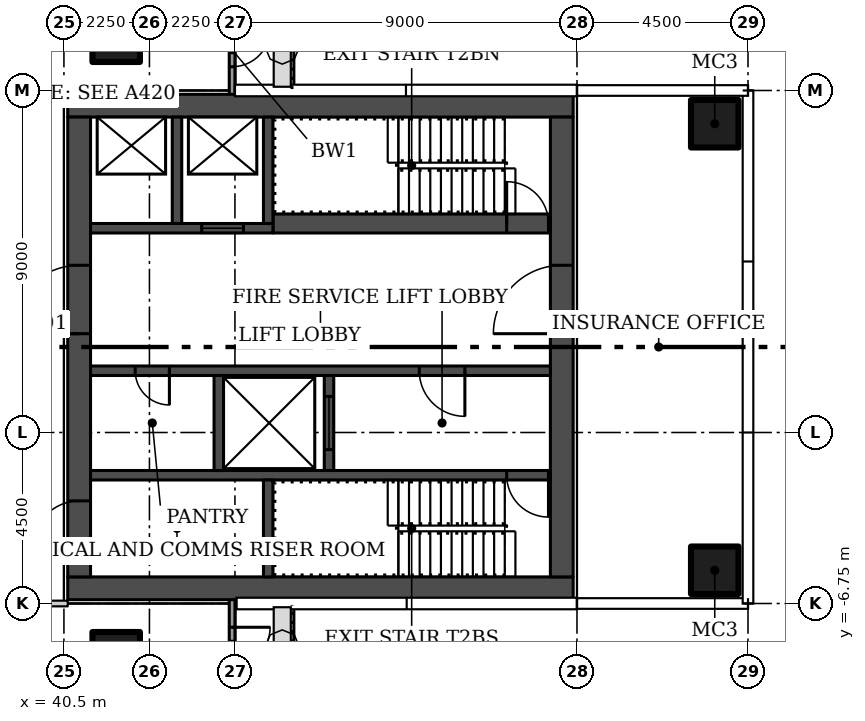
"""IFC4 building model, lengths in metres.
Left out: names, types, materials, properties, quantities, classifications, styles, units other than length and angle.
Written with IfcOpenShell. Run it as: python <this file> out.ifc"""

import sys

from ifc_helpers import new_model, si_unit, direction, frame, frame_2d, origin, origin_2d, place, context, subcontext, project, spatial, rectangle, hollow_rectangle, extrude, element, fill, save


model = new_model("IFC4")
c1 = context("Model", 3, precision=1e-05, world=origin(), true_north=direction((0.0, 1.0)))
c2 = subcontext(c1, "Body", "Model", "MODEL_VIEW")
j1 = project(units=[si_unit("LENGTHUNIT", "METRE"), si_unit("PLANEANGLEUNIT", "RADIAN")], contexts=[c1])
p1 = place(None, origin())
s1 = spatial("IfcSite", under=j1, at=p1, CompositionType="ELEMENT")
p2 = place(p1, origin())
s2 = spatial("IfcBuilding", under=s1, at=p2, CompositionType="ELEMENT")
p3 = place(p2, frame((0.0, 0.0, 120.9)))
s3 = spatial("IfcBuildingStorey", under=s2, at=p3, CompositionType="ELEMENT", Elevation=120.9)
for number, where in (
    (1, (41.875, 8.125, 0.0)),
    (2, (41.875, -8.125, 0.0)),
    (3, (57.625, -5.875, 0.0)),
    (4, (57.625, 5.875, 0.0)),
):
    element("IfcColumn", number, at=place(p3, frame(where)), inside=s3, PredefinedType="COLUMN", context=c2, shape_type="SweptSolid", body=[
        extrude(hollow_rectangle(XDim=1.25, YDim=1.25, WallThickness=0.05, at=origin_2d()), origin(), (0.0, 0.0, 1.0), 3.55),
    ])
p4 = place(p3, frame((26.9, 6.75, 0.0)))
e5 = element("IfcWall", 5, at=p4, inside=s3, PredefinedType="PARTITIONING", context=c2, shape_type="SweptSolid", body=[
    extrude(rectangle(XDim=13.7, YDim=0.15, at=frame_2d((6.85, 0.0))), origin(), (0.0, 0.0, 1.0), 3.55),
])
p5 = place(p4, frame((10.6, 0.0, 0.0)))
e6 = element("IfcOpeningElement", 6, at=p5, cuts=e5, PredefinedType="OPENING", context=c2, shape_type="SweptSolid", body=[
    extrude(rectangle(XDim=1.5, YDim=2.1, at=frame_2d((0.75, 1.05))), frame((0.0, 0.085, 0.0), z_axis=(0.0, -1.0, 0.0), x_axis=(1.0, 0.0, 0.0)), (0.0, 0.0, 1.0), 0.17),
])
p6 = place(p4, frame((6.1, 0.0, 0.0)))
e7 = element("IfcOpeningElement", 7, at=p6, cuts=e5, PredefinedType="OPENING", context=c2, shape_type="SweptSolid", body=[
    extrude(rectangle(XDim=1.5, YDim=2.1, at=frame_2d((0.75, 1.05))), frame((0.0, 0.085, 0.0), z_axis=(0.0, -1.0, 0.0), x_axis=(1.0, 0.0, 0.0)), (0.0, 0.0, 1.0), 0.17),
])
p7 = place(p4, frame((1.6, 0.0, 0.0)))
e8 = element("IfcOpeningElement", 8, at=p7, cuts=e5, PredefinedType="OPENING", context=c2, shape_type="SweptSolid", body=[
    extrude(rectangle(XDim=1.5, YDim=2.1, at=frame_2d((0.75, 1.05))), frame((0.0, 0.085, 0.0), z_axis=(0.0, -1.0, 0.0), x_axis=(1.0, 0.0, 0.0)), (0.0, 0.0, 1.0), 0.17),
])
p8 = place(p3, frame((40.6, -6.75, 0.0), z_axis=(0.0, 0.0, 1.0), x_axis=(-1.0, 0.0, 0.0)))
e9 = element("IfcWall", 9, at=p8, inside=s3, PredefinedType="PARTITIONING", context=c2, shape_type="SweptSolid", body=[
    extrude(rectangle(XDim=13.7, YDim=0.15, at=frame_2d((6.85, 0.0))), origin(), (0.0, 0.0, 1.0), 3.55),
])
p9 = place(p8, frame((10.6, 0.0, 0.0)))
e10 = element("IfcOpeningElement", 10, at=p9, cuts=e9, PredefinedType="OPENING", context=c2, shape_type="SweptSolid", body=[
    extrude(rectangle(XDim=1.5, YDim=2.1, at=frame_2d((0.75, 1.05))), frame((0.0, 0.085, 0.0), z_axis=(0.0, -1.0, 0.0), x_axis=(1.0, 0.0, 0.0)), (0.0, 0.0, 1.0), 0.17),
])
p10 = place(p8, frame((4.1, 0.0, 0.0)))
e11 = element("IfcOpeningElement", 11, at=p10, cuts=e9, PredefinedType="OPENING", context=c2, shape_type="SweptSolid", body=[
    extrude(rectangle(XDim=1.0, YDim=2.4, at=frame_2d((0.5, 1.2))), frame((0.0, 0.085, 0.0), z_axis=(0.0, -1.0, 0.0), x_axis=(1.0, 0.0, 0.0)), (0.0, 0.0, 1.0), 0.17),
])
p11 = place(p3, frame((44.925, 9.0, 0.0), z_axis=(0.0, 0.0, 1.0), x_axis=(0.0, -1.0, 0.0)))
e12 = element("IfcWall", 12, at=p11, inside=s3, PredefinedType="SOLIDWALL", context=c2, shape_type="SweptSolid", body=[
    extrude(rectangle(XDim=2.357, YDim=0.15, at=frame_2d((1.178, 0.0))), origin(), (0.0, 0.0, 1.0), 3.45),
])
p12 = place(p11, frame((0.625, 0.0, 0.0)))
e13 = element("IfcOpeningElement", 13, at=p12, cuts=e12, PredefinedType="OPENING", context=c2, shape_type="SweptSolid", body=[
    extrude(rectangle(XDim=1.0, YDim=2.4, at=frame_2d((0.5, 1.2))), frame((0.0, 0.085, 0.0), z_axis=(0.0, -1.0, 0.0), x_axis=(1.0, 0.0, 0.0)), (0.0, 0.0, 1.0), 0.17),
])
p13 = place(p3, frame((44.925, -6.643, 0.0), z_axis=(0.0, 0.0, 1.0), x_axis=(0.0, -1.0, 0.0)))
e14 = element("IfcWall", 14, at=p13, inside=s3, PredefinedType="SOLIDWALL", context=c2, shape_type="SweptSolid", body=[
    extrude(rectangle(XDim=2.357, YDim=0.15, at=frame_2d((1.178, 0.0))), origin(), (0.0, 0.0, 1.0), 3.45),
])
p14 = place(p13, frame((0.732, 0.0, 0.0)))
e15 = element("IfcOpeningElement", 15, at=p14, cuts=e14, PredefinedType="OPENING", context=c2, shape_type="SweptSolid", body=[
    extrude(rectangle(XDim=1.0, YDim=2.4, at=frame_2d((0.5, 1.2))), frame((0.0, 0.085, 0.0), z_axis=(0.0, -1.0, 0.0), x_axis=(1.0, 0.0, 0.0)), (0.0, 0.0, 1.0), 0.17),
])
for number, where, z_axis, x_axis in (
    (16, (53.9, -6.35, 0.0), (0.0, 0.0, 1.0), (-1.0, 0.0, 0.0)),
    (17, (53.9, 6.35, 0.0), (0.0, 0.0, 1.0), (-1.0, 0.0, 0.0)),
):
    element("IfcWall", number, at=place(p3, frame(where, z_axis=z_axis, x_axis=x_axis)), inside=s3, PredefinedType="SHEAR", context=c2, shape_type="SweptSolid", body=[
        extrude(rectangle(XDim=13.3, YDim=0.6, at=frame_2d((6.65, 0.0))), origin(), (0.0, 0.0, 1.0), 3.55),
    ])
p15 = place(p3, frame((53.6, -6.05, 0.0), z_axis=(0.0, 0.0, 1.0), x_axis=(0.0, 1.0, 0.0)))
e18 = element("IfcWall", 18, at=p15, inside=s3, PredefinedType="SHEAR", context=c2, shape_type="SweptSolid", body=[
    extrude(rectangle(XDim=12.1, YDim=0.6, at=frame_2d((6.05, 0.0))), origin(), (0.0, 0.0, 1.0), 3.55),
])
p16 = place(p15, frame((6.4, 0.0, 0.0)))
e19 = element("IfcOpeningElement", 19, at=p16, cuts=e18, PredefinedType="OPENING", context=c2, shape_type="SweptSolid", body=[
    extrude(rectangle(XDim=1.8, YDim=2.4, at=frame_2d((0.9, 1.2))), frame((0.0, 0.31, 0.0), z_axis=(0.0, -1.0, 0.0), x_axis=(1.0, 0.0, 0.0)), (0.0, 0.0, 1.0), 0.62),
])
p17 = place(p3, frame((40.9, -6.05, 0.0), z_axis=(0.0, 0.0, 1.0), x_axis=(0.0, 1.0, 0.0)))
e20 = element("IfcWall", 20, at=p17, inside=s3, PredefinedType="SHEAR", context=c2, shape_type="SweptSolid", body=[
    extrude(rectangle(XDim=12.1, YDim=0.6, at=frame_2d((6.05, 0.0))), origin(), (0.0, 0.0, 1.0), 3.55),
])
p18 = place(p17, frame((0.8, 0.0, 0.0)))
e21 = element("IfcOpeningElement", 21, at=p18, cuts=e20, PredefinedType="OPENING", context=c2, shape_type="SweptSolid", body=[
    extrude(rectangle(XDim=1.2, YDim=2.1, at=frame_2d((0.6, 1.05))), frame((0.0, 0.31, 0.0), z_axis=(0.0, -1.0, 0.0), x_axis=(1.0, 0.0, 0.0)), (0.0, 0.0, 1.0), 0.62),
])
p19 = place(p17, frame((6.4, 0.0, 0.0)))
e22 = element("IfcOpeningElement", 22, at=p19, cuts=e20, PredefinedType="OPENING", context=c2, shape_type="SweptSolid", body=[
    extrude(rectangle(XDim=1.8, YDim=2.4, at=frame_2d((0.9, 1.2))), frame((0.0, 0.31, 0.0), z_axis=(0.0, -1.0, 0.0), x_axis=(1.0, 0.0, 0.0)), (0.0, 0.0, 1.0), 0.62),
])
p20 = place(p3, frame((53.3, -3.375, 0.0), z_axis=(0.0, 0.0, 1.0), x_axis=(-1.0, 0.0, 0.0)))
e23 = element("IfcWall", 23, at=p20, inside=s3, PredefinedType="SHEAR", context=c2, shape_type="SweptSolid", body=[
    extrude(rectangle(XDim=12.1, YDim=0.25, at=frame_2d((6.05, 0.0))), origin(), (0.0, 0.0, 1.0), 3.55),
])
p21 = place(p20, frame((0.05, 0.0, 0.0)))
e24 = element("IfcOpeningElement", 24, at=p21, cuts=e23, PredefinedType="OPENING", context=c2, shape_type="SweptSolid", body=[
    extrude(rectangle(XDim=1.1, YDim=2.1, at=frame_2d((0.55, 1.05))), frame((0.0, 0.135, 0.0), z_axis=(0.0, -1.0, 0.0), x_axis=(1.0, 0.0, 0.0)), (0.0, 0.0, 1.0), 0.27),
])
p22 = place(p3, frame((45.875, -6.05, 0.0), z_axis=(0.0, 0.0, 1.0), x_axis=(0.0, 1.0, 0.0)))
e25 = element("IfcWall", 25, at=p22, inside=s3, PredefinedType="SHEAR", context=c2, shape_type="SweptSolid", body=[
    extrude(rectangle(XDim=2.55, YDim=0.25, at=frame_2d((1.275, 0.0))), origin(), (0.0, 0.0, 1.0), 3.55),
])
p23 = place(p3, frame((53.3, -0.625, 0.0), z_axis=(0.0, 0.0, 1.0), x_axis=(-1.0, 0.0, 0.0)))
e26 = element("IfcWall", 26, at=p23, inside=s3, PredefinedType="SHEAR", context=c2, shape_type="SweptSolid", body=[
    extrude(rectangle(XDim=12.1, YDim=0.25, at=frame_2d((6.05, 0.0))), origin(), (0.0, 0.0, 1.0), 3.55),
])
p24 = place(p23, frame((2.25, 0.0, 0.0)))
e27 = element("IfcOpeningElement", 27, at=p24, cuts=e26, PredefinedType="OPENING", context=c2, shape_type="SweptSolid", body=[
    extrude(rectangle(XDim=1.2, YDim=2.1, at=frame_2d((0.6, 1.05))), frame((0.0, 0.135, 0.0), z_axis=(0.0, -1.0, 0.0), x_axis=(1.0, 0.0, 0.0)), (0.0, 0.0, 1.0), 0.27),
])
p25 = place(p23, frame((10.025, 0.0, 0.0)))
e28 = element("IfcOpeningElement", 28, at=p25, cuts=e26, PredefinedType="OPENING", context=c2, shape_type="SweptSolid", body=[
    extrude(rectangle(XDim=0.9, YDim=2.1, at=frame_2d((0.45, 1.05))), frame((0.0, 0.135, 0.0), z_axis=(0.0, -1.0, 0.0), x_axis=(1.0, 0.0, 0.0)), (0.0, 0.0, 1.0), 0.27),
])
p26 = place(p3, frame((47.475, -3.25, 0.0), z_axis=(0.0, 0.0, 1.0), x_axis=(0.0, 1.0, 0.0)))
e29 = element("IfcWall", 29, at=p26, inside=s3, PredefinedType="SHEAR", context=c2, shape_type="SweptSolid", body=[
    extrude(rectangle(XDim=2.5, YDim=0.25, at=frame_2d((1.25, 0.0))), origin(), (0.0, 0.0, 1.0), 3.55),
])
p27 = place(p26, frame((0.55, 0.0, 0.0)))
e30 = element("IfcOpeningElement", 30, at=p27, cuts=e29, PredefinedType="OPENING", context=c2, shape_type="SweptSolid", body=[
    extrude(rectangle(XDim=1.4, YDim=2.4, at=frame_2d((0.7, 1.2))), frame((0.0, 0.135, 0.0), z_axis=(0.0, -1.0, 0.0), x_axis=(1.0, 0.0, 0.0)), (0.0, 0.0, 1.0), 0.27),
])
p28 = place(p3, frame((44.575, -3.25, 0.0), z_axis=(0.0, 0.0, 1.0), x_axis=(0.0, 1.0, 0.0)))
e31 = element("IfcWall", 31, at=p28, inside=s3, PredefinedType="SHEAR", context=c2, shape_type="SweptSolid", body=[
    extrude(rectangle(XDim=2.5, YDim=0.25, at=frame_2d((1.25, 0.0))), origin(), (0.0, 0.0, 1.0), 3.55),
])
p29 = place(p3, frame((46.0, 3.25, 0.0)))
e32 = element("IfcWall", 32, at=p29, inside=s3, PredefinedType="SHEAR", context=c2, shape_type="SweptSolid", body=[
    extrude(rectangle(XDim=7.3, YDim=0.5, at=frame_2d((3.65, 0.0))), origin(), (0.0, 0.0, 1.0), 3.55),
])
p30 = place(p29, frame((6.15, 0.0, 0.0)))
e33 = element("IfcOpeningElement", 33, at=p30, cuts=e32, PredefinedType="OPENING", context=c2, shape_type="SweptSolid", body=[
    extrude(rectangle(XDim=1.1, YDim=2.1, at=frame_2d((0.55, 1.05))), frame((0.0, 0.26, 0.0), z_axis=(0.0, -1.0, 0.0), x_axis=(1.0, 0.0, 0.0)), (0.0, 0.0, 1.0), 0.52),
])
p31 = place(p3, frame((46.0, 3.125, 0.0), z_axis=(0.0, 0.0, 1.0), x_axis=(-1.0, 0.0, 0.0)))
e34 = element("IfcWall", 34, at=p31, inside=s3, PredefinedType="SHEAR", context=c2, shape_type="SweptSolid", body=[
    extrude(rectangle(XDim=4.8, YDim=0.25, at=frame_2d((2.4, 0.0))), origin(), (0.0, 0.0, 1.0), 3.55),
])
p32 = place(p31, frame((0.775, 0.0, 0.0)))
e35 = element("IfcOpeningElement", 35, at=p32, cuts=e34, PredefinedType="OPENING", context=c2, shape_type="SweptSolid", body=[
    extrude(rectangle(XDim=1.1, YDim=2.1, at=frame_2d((0.55, 1.05))), frame((0.0, 0.135, 0.0), z_axis=(0.0, -1.0, 0.0), x_axis=(1.0, 0.0, 0.0)), (0.0, 0.0, 1.0), 0.27),
])
for number, where, z_axis, x_axis in (
    (36, (45.875, 3.25, 0.0), (0.0, 0.0, 1.0), (0.0, 1.0, 0.0)),
    (37, (43.475, 3.25, 0.0), (0.0, 0.0, 1.0), (0.0, 1.0, 0.0)),
):
    element("IfcWall", number, at=place(p3, frame(where, z_axis=z_axis, x_axis=x_axis)), inside=s3, PredefinedType="SHEAR", context=c2, shape_type="SweptSolid", body=[
        extrude(rectangle(XDim=2.8, YDim=0.25, at=frame_2d((1.4, 0.0))), origin(), (0.0, 0.0, 1.0), 3.55),
    ])
p33 = place(p12, origin())
e38 = element("IfcDoor", 38, at=p33, inside=s3, OperationType="SINGLE_SWING_LEFT", PredefinedType="DOOR", context=c2, shape_type="SweptSolid", body=[
    extrude(rectangle(XDim=1.0, YDim=2.4, at=frame_2d((0.5, 1.2))), frame((0.0, 0.025, 0.0), z_axis=(0.0, -1.0, 0.0), x_axis=(1.0, 0.0, 0.0)), (0.0, 0.0, 1.0), 0.05),
])
fill(e13, e38)
p34 = place(p14, origin())
e39 = element("IfcDoor", 39, at=p34, inside=s3, OperationType="SINGLE_SWING_RIGHT", PredefinedType="DOOR", context=c2, shape_type="SweptSolid", body=[
    extrude(rectangle(XDim=1.0, YDim=2.4, at=frame_2d((0.5, 1.2))), frame((0.0, 0.025, 0.0), z_axis=(0.0, -1.0, 0.0), x_axis=(1.0, 0.0, 0.0)), (0.0, 0.0, 1.0), 0.05),
])
fill(e15, e39)
p35 = place(p16, origin())
e40 = element("IfcDoor", 40, at=p35, inside=s3, OperationType="DOUBLE_DOOR_SINGLE_SWING", PredefinedType="DOOR", context=c2, shape_type="SweptSolid", body=[
    extrude(rectangle(XDim=1.8, YDim=2.4, at=frame_2d((0.9, 1.2))), frame((0.0, 0.025, 0.0), z_axis=(0.0, -1.0, 0.0), x_axis=(1.0, 0.0, 0.0)), (0.0, 0.0, 1.0), 0.05),
])
fill(e19, e40)
p36 = place(p18, origin())
e41 = element("IfcDoor", 41, at=p36, inside=s3, OperationType="SINGLE_SWING_LEFT", PredefinedType="DOOR", context=c2, shape_type="SweptSolid", body=[
    extrude(rectangle(XDim=1.2, YDim=2.1, at=frame_2d((0.6, 1.05))), frame((0.0, 0.025, 0.0), z_axis=(0.0, -1.0, 0.0), x_axis=(1.0, 0.0, 0.0)), (0.0, 0.0, 1.0), 0.05),
])
fill(e21, e41)
p37 = place(p19, origin())
e42 = element("IfcDoor", 42, at=p37, inside=s3, OperationType="DOUBLE_DOOR_SINGLE_SWING", PredefinedType="DOOR", context=c2, shape_type="SweptSolid", body=[
    extrude(rectangle(XDim=1.8, YDim=2.4, at=frame_2d((0.9, 1.2))), frame((0.0, 0.025, 0.0), z_axis=(0.0, -1.0, 0.0), x_axis=(1.0, 0.0, 0.0)), (0.0, 0.0, 1.0), 0.05),
])
fill(e22, e42)
p38 = place(p21, origin())
e43 = element("IfcDoor", 43, at=p38, inside=s3, OperationType="SINGLE_SWING_LEFT", PredefinedType="DOOR", context=c2, shape_type="SweptSolid", body=[
    extrude(rectangle(XDim=1.1, YDim=2.1, at=frame_2d((0.55, 1.05))), frame((0.0, 0.025, 0.0), z_axis=(0.0, -1.0, 0.0), x_axis=(1.0, 0.0, 0.0)), (0.0, 0.0, 1.0), 0.05),
])
fill(e24, e43)
p39 = place(p24, origin())
e44 = element("IfcDoor", 44, at=p39, inside=s3, OperationType="SINGLE_SWING_LEFT", PredefinedType="DOOR", context=c2, shape_type="SweptSolid", body=[
    extrude(rectangle(XDim=1.2, YDim=2.1, at=frame_2d((0.6, 1.05))), frame((0.0, 0.025, 0.0), z_axis=(0.0, -1.0, 0.0), x_axis=(1.0, 0.0, 0.0)), (0.0, 0.0, 1.0), 0.05),
])
fill(e27, e44)
p40 = place(p25, origin())
e45 = element("IfcDoor", 45, at=p40, inside=s3, OperationType="SINGLE_SWING_RIGHT", PredefinedType="DOOR", context=c2, shape_type="SweptSolid", body=[
    extrude(rectangle(XDim=0.9, YDim=2.1, at=frame_2d((0.45, 1.05))), frame((0.0, 0.025, 0.0), z_axis=(0.0, -1.0, 0.0), x_axis=(1.0, 0.0, 0.0)), (0.0, 0.0, 1.0), 0.05),
])
fill(e28, e45)
p41 = place(p27, origin())
e46 = element("IfcDoor", 46, at=p41, inside=s3, OperationType="SLIDING_TO_LEFT", PredefinedType="DOOR", context=c2, shape_type="SweptSolid", body=[
    extrude(rectangle(XDim=1.4, YDim=2.4, at=frame_2d((0.7, 1.2))), frame((0.0, 0.025, 0.0), z_axis=(0.0, -1.0, 0.0), x_axis=(1.0, 0.0, 0.0)), (0.0, 0.0, 1.0), 0.05),
])
fill(e30, e46)
p42 = place(p30, origin())
e47 = element("IfcDoor", 47, at=p42, inside=s3, OperationType="SINGLE_SWING_RIGHT", PredefinedType="DOOR", context=c2, shape_type="SweptSolid", body=[
    extrude(rectangle(XDim=1.1, YDim=2.1, at=frame_2d((0.55, 1.05))), frame((0.0, 0.025, 0.0), z_axis=(0.0, -1.0, 0.0), x_axis=(1.0, 0.0, 0.0)), (0.0, 0.0, 1.0), 0.05),
])
fill(e33, e47)
p43 = place(p32, origin())
e48 = element("IfcDoor", 48, at=p43, inside=s3, OperationType="SLIDING_TO_LEFT", PredefinedType="DOOR", context=c2, shape_type="SweptSolid", body=[
    extrude(rectangle(XDim=1.1, YDim=2.1, at=frame_2d((0.55, 1.05))), frame((0.0, 0.025, 0.0), z_axis=(0.0, -1.0, 0.0), x_axis=(1.0, 0.0, 0.0)), (0.0, 0.0, 1.0), 0.05),
])
fill(e35, e48)
save(model, sys.argv[1])
